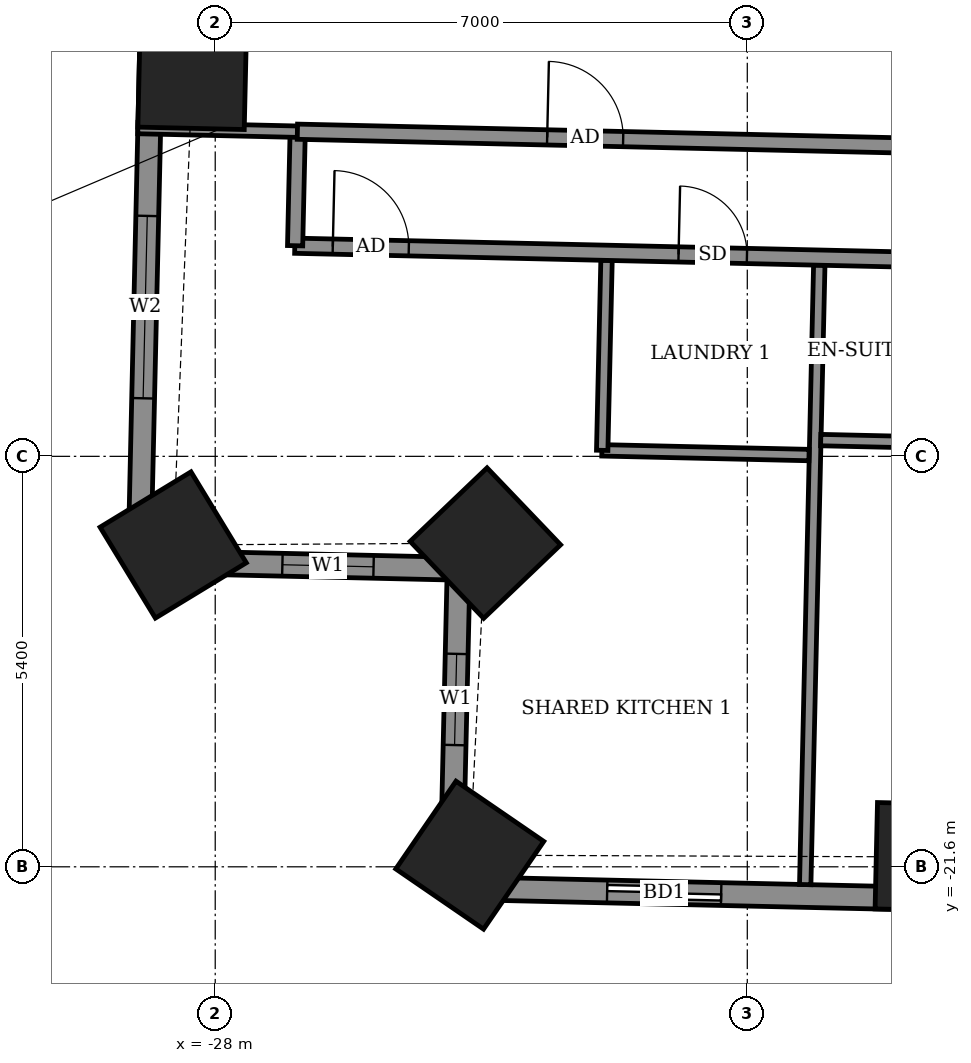
"""IFC4 building model, lengths in metres.
Left out: names, types, materials, properties, quantities, classifications, styles, units other than length and angle.
Written with IfcOpenShell. Run it as: python <this file> out.ifc"""

import sys

from ifc_helpers import new_model, si_unit, direction, frame, frame_2d, origin, origin_2d, place, context, subcontext, project, spatial, rectangle, extrude, element, fill, save


model = new_model("IFC4")
c1 = context("Model", 3, precision=1e-05, world=origin(), true_north=direction((0.0, 1.0)))
c2 = subcontext(c1, "Body", "Model", "MODEL_VIEW")
j1 = project(units=[si_unit("LENGTHUNIT", "METRE"), si_unit("PLANEANGLEUNIT", "RADIAN")], contexts=[c1])
p1 = place(None, origin())
s1 = spatial("IfcSite", under=j1, at=p1, CompositionType="ELEMENT")
p2 = place(p1, origin())
s2 = spatial("IfcBuilding", under=s1, at=p2, CompositionType="ELEMENT")
p3 = place(p2, frame((0.0, 0.0, 109.1)))
s3 = spatial("IfcBuildingStorey", under=s2, at=p3, CompositionType="ELEMENT", Elevation=109.1)
for number, where, z_axis, x_axis in (
    (1, (-28.302, -11.185, -0.55), (0.0, 0.0, 1.0), (-0.023, -1.0, 0.0)),
    (2, (-28.553, -17.366, -0.55), (0.0, 0.0, 1.0), (0.52, -0.854, 0.0)),
    (3, (-24.446, -17.341, -0.55), (0.0, 0.0, 1.0), (0.691, -0.723, 0.0)),
    (4, (-24.651, -21.447, -0.55), (0.0, 0.0, 1.0), (0.825, -0.566, 0.0)),
    (5, (-18.603, -21.47, -0.55), (0.0, 0.0, 1.0), (1.0, -0.023, 0.0)),
):
    element("IfcColumn", number, at=place(p3, frame(where, z_axis=z_axis, x_axis=x_axis)), inside=s3, PredefinedType="COLUMN", context=c2, shape_type="SweptSolid", body=[
        extrude(rectangle(XDim=1.4, YDim=1.4, at=origin_2d()), origin(), (0.0, 0.0, 1.0), 3.6),
    ])
p4 = place(p3, frame((-28.702, -4.557, 0.0), z_axis=(0.0, 0.0, 1.0), x_axis=(-0.022653729471, -0.999743371341, 0.0)))
e6 = element("IfcWall", 6, at=p4, inside=s3, PredefinedType="SOLIDWALL", context=c2, shape_type="SweptSolid", body=[
    extrude(rectangle(XDim=13.03, YDim=0.3, at=frame_2d((6.515, 0.0))), origin(), (0.0, 0.0, 1.0), 3.05),
])
p5 = place(p4, frame((1.042, 0.0, 0.0)))
e7 = element("IfcOpeningElement", 7, at=p5, cuts=e6, PredefinedType="OPENING", context=c2, shape_type="SweptSolid", body=[
    extrude(rectangle(XDim=1.5, YDim=2.4, at=frame_2d((0.75, 1.2))), frame((0.0, 0.16, 0.0), z_axis=(0.0, -1.0, 0.0), x_axis=(1.0, 0.0, 0.0)), (0.0, 0.0, 1.0), 0.32),
])
p6 = place(p4, frame((3.398, 0.0, 0.9)))
e8 = element("IfcOpeningElement", 8, at=p6, cuts=e6, PredefinedType="OPENING", context=c2, shape_type="SweptSolid", body=[
    extrude(rectangle(XDim=2.4, YDim=1.5, at=frame_2d((1.2, 0.75))), frame((0.0, 0.16, 0.0), z_axis=(0.0, -1.0, 0.0), x_axis=(1.0, 0.0, 0.0)), (0.0, 0.0, 1.0), 0.32),
])
p7 = place(p4, frame((8.482, 0.0, 0.9)))
e9 = element("IfcOpeningElement", 9, at=p7, cuts=e6, PredefinedType="OPENING", context=c2, shape_type="SweptSolid", body=[
    extrude(rectangle(XDim=2.4, YDim=1.5, at=frame_2d((1.2, 0.75))), frame((0.0, 0.16, 0.0), z_axis=(0.0, -1.0, 0.0), x_axis=(1.0, 0.0, 0.0)), (0.0, 0.0, 1.0), 0.32),
])
p8 = place(p3, frame((-28.997, -17.583, 0.0), z_axis=(0.0, 0.0, 1.0), x_axis=(0.999739037152, -0.022844202663, 0.0)))
e10 = element("IfcWall", 10, at=p8, inside=s3, PredefinedType="SOLIDWALL", context=c2, shape_type="SweptSolid", body=[
    extrude(rectangle(XDim=4.2, YDim=0.3, at=frame_2d((2.1, 0.0))), origin(), (0.0, 0.0, 1.0), 2.55),
])
p9 = place(p8, frame((1.881, 0.0, 0.9)))
e11 = element("IfcOpeningElement", 11, at=p9, cuts=e10, PredefinedType="OPENING", context=c2, shape_type="SweptSolid", body=[
    extrude(rectangle(XDim=1.2, YDim=1.5, at=frame_2d((0.6, 0.75))), frame((0.0, 0.16, 0.0), z_axis=(0.0, -1.0, 0.0), x_axis=(1.0, 0.0, 0.0)), (0.0, 0.0, 1.0), 0.32),
])
p10 = place(p3, frame((-24.798, -17.679, 0.0), z_axis=(0.0, 0.0, 1.0), x_axis=(-0.022844202663, -0.999739037152, 0.0)))
e12 = element("IfcWall", 12, at=p10, inside=s3, PredefinedType="SOLIDWALL", context=c2, shape_type="SweptSolid", body=[
    extrude(rectangle(XDim=4.2, YDim=0.3, at=frame_2d((2.1, 0.0))), origin(), (0.0, 0.0, 1.0), 2.55),
])
p11 = place(p10, frame((1.12, 0.0, 0.9)))
e13 = element("IfcOpeningElement", 13, at=p11, cuts=e12, PredefinedType="OPENING", context=c2, shape_type="SweptSolid", body=[
    extrude(rectangle(XDim=1.2, YDim=1.5, at=frame_2d((0.6, 0.75))), frame((0.0, 0.16, 0.0), z_axis=(0.0, -1.0, 0.0), x_axis=(1.0, 0.0, 0.0)), (0.0, 0.0, 1.0), 0.32),
])
p12 = place(p3, frame((-24.894, -21.878, 0.0), z_axis=(0.0, 0.0, 1.0), x_axis=(0.999742689045, -0.022683820265, 0.0)))
e14 = element("IfcWall", 14, at=p12, inside=s3, PredefinedType="SOLIDWALL", context=c2, shape_type="SweptSolid", body=[
    extrude(rectangle(XDim=44.708, YDim=0.3, at=frame_2d((22.354, 0.0))), origin(), (0.0, 0.0, 1.0), 3.05),
])
p13 = place(p12, frame((2.051, 0.0, 0.0)))
e15 = element("IfcOpeningElement", 15, at=p13, cuts=e14, PredefinedType="OPENING", context=c2, shape_type="SweptSolid", body=[
    extrude(rectangle(XDim=1.5, YDim=2.4, at=frame_2d((0.75, 1.2))), frame((0.0, 0.16, 0.0), z_axis=(0.0, -1.0, 0.0), x_axis=(1.0, 0.0, 0.0)), (0.0, 0.0, 1.0), 0.32),
])
p14 = place(p12, frame((7.265, 0.0, 0.0)))
e16 = element("IfcOpeningElement", 16, at=p14, cuts=e14, PredefinedType="OPENING", context=c2, shape_type="SweptSolid", body=[
    extrude(rectangle(XDim=1.5, YDim=2.4, at=frame_2d((0.75, 1.2))), frame((0.0, 0.16, 0.0), z_axis=(0.0, -1.0, 0.0), x_axis=(1.0, 0.0, 0.0)), (0.0, 0.0, 1.0), 0.32),
])
p15 = place(p12, frame((10.03, 0.0, 0.0)))
e17 = element("IfcOpeningElement", 17, at=p15, cuts=e14, PredefinedType="OPENING", context=c2, shape_type="SweptSolid", body=[
    extrude(rectangle(XDim=1.5, YDim=2.4, at=frame_2d((0.75, 1.2))), frame((0.0, 0.16, 0.0), z_axis=(0.0, -1.0, 0.0), x_axis=(1.0, 0.0, 0.0)), (0.0, 0.0, 1.0), 0.32),
])
p16 = place(p12, frame((15.5, 0.0, 0.0)))
e18 = element("IfcOpeningElement", 18, at=p16, cuts=e14, PredefinedType="OPENING", context=c2, shape_type="SweptSolid", body=[
    extrude(rectangle(XDim=1.5, YDim=2.4, at=frame_2d((0.75, 1.2))), frame((0.0, 0.16, 0.0), z_axis=(0.0, -1.0, 0.0), x_axis=(1.0, 0.0, 0.0)), (0.0, 0.0, 1.0), 0.32),
])
p17 = place(p12, frame((20.745, 0.0, 0.0)))
e19 = element("IfcOpeningElement", 19, at=p17, cuts=e14, PredefinedType="OPENING", context=c2, shape_type="SweptSolid", body=[
    extrude(rectangle(XDim=1.5, YDim=2.4, at=frame_2d((0.75, 1.2))), frame((0.0, 0.16, 0.0), z_axis=(0.0, -1.0, 0.0), x_axis=(1.0, 0.0, 0.0)), (0.0, 0.0, 1.0), 0.32),
])
p18 = place(p12, frame((26.41, 0.0, 0.0)))
e20 = element("IfcOpeningElement", 20, at=p18, cuts=e14, PredefinedType="OPENING", context=c2, shape_type="SweptSolid", body=[
    extrude(rectangle(XDim=1.2, YDim=2.4, at=frame_2d((0.6, 1.2))), frame((0.0, 0.16, 0.0), z_axis=(0.0, -1.0, 0.0), x_axis=(1.0, 0.0, 0.0)), (0.0, 0.0, 1.0), 0.32),
])
p19 = place(p12, frame((29.024, 0.0, 0.0)))
e21 = element("IfcOpeningElement", 21, at=p19, cuts=e14, PredefinedType="OPENING", context=c2, shape_type="SweptSolid", body=[
    extrude(rectangle(XDim=1.5, YDim=2.4, at=frame_2d((0.75, 1.2))), frame((0.0, 0.16, 0.0), z_axis=(0.0, -1.0, 0.0), x_axis=(1.0, 0.0, 0.0)), (0.0, 0.0, 1.0), 0.32),
])
p20 = place(p12, frame((34.45, 0.0, 0.0)))
e22 = element("IfcOpeningElement", 22, at=p20, cuts=e14, PredefinedType="OPENING", context=c2, shape_type="SweptSolid", body=[
    extrude(rectangle(XDim=1.5, YDim=2.4, at=frame_2d((0.75, 1.2))), frame((0.0, 0.16, 0.0), z_axis=(0.0, -1.0, 0.0), x_axis=(1.0, 0.0, 0.0)), (0.0, 0.0, 1.0), 0.32),
])
p21 = place(p12, frame((40.087, 0.0, 0.9)))
e23 = element("IfcOpeningElement", 23, at=p21, cuts=e14, PredefinedType="OPENING", context=c2, shape_type="SweptSolid", body=[
    extrude(rectangle(XDim=2.4, YDim=1.5, at=frame_2d((1.2, 0.75))), frame((0.0, 0.16, 0.0), z_axis=(0.0, -1.0, 0.0), x_axis=(1.0, 0.0, 0.0)), (0.0, 0.0, 1.0), 0.32),
])
p22 = place(p3, frame((-20.238, -21.834, 0.0), z_axis=(0.0, 0.0, 1.0), x_axis=(0.0227037155, 0.99974223743, 0.0)))
e24 = element("IfcWall", 24, at=p22, inside=s3, PredefinedType="PARTITIONING", context=c2, shape_type="SweptSolid", body=[
    extrude(rectangle(XDim=8.151, YDim=0.15, at=frame_2d((4.076, 0.0))), origin(), (0.0, 0.0, 1.0), 2.55),
])
p23 = place(p3, frame((-22.913, -16.121, 0.0), z_axis=(0.0, 0.0, 1.0), x_axis=(0.999741187782, -0.022749889061, 0.0)))
e25 = element("IfcWall", 25, at=p23, inside=s3, PredefinedType="PARTITIONING", context=c2, shape_type="SweptSolid", body=[
    extrude(rectangle(XDim=2.726, YDim=0.15, at=frame_2d((1.363, 0.0))), origin(), (0.0, 0.0, 1.0), 3.05),
])
p24 = place(p3, frame((-22.909, -16.121, 0.0), z_axis=(0.0, 0.0, 1.0), x_axis=(0.022756903044, 0.999741028149, 0.0)))
e26 = element("IfcWall", 26, at=p24, inside=s3, PredefinedType="PARTITIONING", context=c2, shape_type="SweptSolid", body=[
    extrude(rectangle(XDim=2.5, YDim=0.15, at=frame_2d((1.25, 0.0))), origin(), (0.0, 0.0, 1.0), 3.05),
])
p25 = place(p3, frame((-20.034, -15.986, 0.0), z_axis=(0.0, 0.0, 1.0), x_axis=(0.999740478815, -0.022781023197, 0.0)))
e27 = element("IfcWall", 27, at=p25, inside=s3, PredefinedType="PARTITIONING", context=c2, shape_type="SweptSolid", body=[
    extrude(rectangle(XDim=2.325, YDim=0.15, at=frame_2d((1.163, 0.0))), origin(), (0.0, 0.0, 1.0), 3.05),
])
p26 = place(p3, frame((-26.953, -13.429, 0.0), z_axis=(0.0, 0.0, 1.0), x_axis=(0.999742734556, -0.02268181435, 0.0)))
e28 = element("IfcWall", 28, at=p26, inside=s3, PredefinedType="PARTITIONING", context=c2, shape_type="SweptSolid", body=[
    extrude(rectangle(XDim=50.708, YDim=0.2, at=frame_2d((25.354, 0.0))), origin(), (0.0, 0.0, 1.0), 3.05),
])
p27 = place(p26, frame((0.5, 0.0, 0.0)))
e29 = element("IfcOpeningElement", 29, at=p27, cuts=e28, PredefinedType="OPENING", context=c2, shape_type="SweptSolid", body=[
    extrude(rectangle(XDim=1.0, YDim=2.1, at=frame_2d((0.5, 1.05))), frame((0.0, 0.11, 0.0), z_axis=(0.0, -1.0, 0.0), x_axis=(1.0, 0.0, 0.0)), (0.0, 0.0, 1.0), 0.22),
])
p28 = place(p26, frame((5.05, 0.0, 0.0)))
e30 = element("IfcOpeningElement", 30, at=p28, cuts=e28, PredefinedType="OPENING", context=c2, shape_type="SweptSolid", body=[
    extrude(rectangle(XDim=0.9, YDim=2.1, at=frame_2d((0.45, 1.05))), frame((0.0, 0.11, 0.0), z_axis=(0.0, -1.0, 0.0), x_axis=(1.0, 0.0, 0.0)), (0.0, 0.0, 1.0), 0.22),
])
p29 = place(p26, frame((9.975, 0.0, 0.0)))
e31 = element("IfcOpeningElement", 31, at=p29, cuts=e28, PredefinedType="OPENING", context=c2, shape_type="SweptSolid", body=[
    extrude(rectangle(XDim=0.9, YDim=2.1, at=frame_2d((0.45, 1.05))), frame((0.0, 0.11, 0.0), z_axis=(0.0, -1.0, 0.0), x_axis=(1.0, 0.0, 0.0)), (0.0, 0.0, 1.0), 0.22),
])
p30 = place(p26, frame((12.175, 0.0, 0.0)))
e32 = element("IfcOpeningElement", 32, at=p30, cuts=e28, PredefinedType="OPENING", context=c2, shape_type="SweptSolid", body=[
    extrude(rectangle(XDim=0.9, YDim=2.1, at=frame_2d((0.45, 1.05))), frame((0.0, 0.11, 0.0), z_axis=(0.0, -1.0, 0.0), x_axis=(1.0, 0.0, 0.0)), (0.0, 0.0, 1.0), 0.22),
])
p31 = place(p26, frame((19.25, 0.0, 0.0)))
e33 = element("IfcOpeningElement", 33, at=p31, cuts=e28, PredefinedType="OPENING", context=c2, shape_type="SweptSolid", body=[
    extrude(rectangle(XDim=0.9, YDim=2.1, at=frame_2d((0.45, 1.05))), frame((0.0, 0.11, 0.0), z_axis=(0.0, -1.0, 0.0), x_axis=(1.0, 0.0, 0.0)), (0.0, 0.0, 1.0), 0.22),
])
p32 = place(p26, frame((21.625, 0.0, 0.0)))
e34 = element("IfcOpeningElement", 34, at=p32, cuts=e28, PredefinedType="OPENING", context=c2, shape_type="SweptSolid", body=[
    extrude(rectangle(XDim=0.9, YDim=2.1, at=frame_2d((0.45, 1.05))), frame((0.0, 0.11, 0.0), z_axis=(0.0, -1.0, 0.0), x_axis=(1.0, 0.0, 0.0)), (0.0, 0.0, 1.0), 0.22),
])
p33 = place(p26, frame((28.7, 0.0, 0.0)))
e35 = element("IfcOpeningElement", 35, at=p33, cuts=e28, PredefinedType="OPENING", context=c2, shape_type="SweptSolid", body=[
    extrude(rectangle(XDim=0.9, YDim=2.1, at=frame_2d((0.45, 1.05))), frame((0.0, 0.11, 0.0), z_axis=(0.0, -1.0, 0.0), x_axis=(1.0, 0.0, 0.0)), (0.0, 0.0, 1.0), 0.22),
])
p34 = place(p26, frame((31.025, 0.0, 0.0)))
e36 = element("IfcOpeningElement", 36, at=p34, cuts=e28, PredefinedType="OPENING", context=c2, shape_type="SweptSolid", body=[
    extrude(rectangle(XDim=0.9, YDim=2.1, at=frame_2d((0.45, 1.05))), frame((0.0, 0.11, 0.0), z_axis=(0.0, -1.0, 0.0), x_axis=(1.0, 0.0, 0.0)), (0.0, 0.0, 1.0), 0.22),
])
p35 = place(p26, frame((38.2, 0.0, 0.0)))
e37 = element("IfcOpeningElement", 37, at=p35, cuts=e28, PredefinedType="OPENING", context=c2, shape_type="SweptSolid", body=[
    extrude(rectangle(XDim=0.9, YDim=2.1, at=frame_2d((0.45, 1.05))), frame((0.0, 0.11, 0.0), z_axis=(0.0, -1.0, 0.0), x_axis=(1.0, 0.0, 0.0)), (0.0, 0.0, 1.0), 0.22),
])
p36 = place(p26, frame((44.484, 0.0, 0.0)))
e38 = element("IfcOpeningElement", 38, at=p36, cuts=e28, PredefinedType="OPENING", context=c2, shape_type="SweptSolid", body=[
    extrude(rectangle(XDim=1.0, YDim=2.1, at=frame_2d((0.5, 1.05))), frame((0.0, 0.11, 0.0), z_axis=(0.0, -1.0, 0.0), x_axis=(1.0, 0.0, 0.0)), (0.0, 0.0, 1.0), 0.22),
])
p37 = place(p3, frame((-26.949, -13.429, 0.0), z_axis=(0.0, 0.0, 1.0), x_axis=(0.022617910375, 0.999744182344, 0.0)))
e39 = element("IfcWall", 39, at=p37, inside=s3, PredefinedType="PARTITIONING", context=c2, shape_type="SweptSolid", body=[
    extrude(rectangle(XDim=1.5, YDim=0.2, at=frame_2d((0.75, 0.0))), origin(), (0.0, 0.0, 1.0), 3.05),
])
p38 = place(p3, frame((-29.018, -11.881, 0.0), z_axis=(0.0, 0.0, 1.0), x_axis=(0.999741236023, -0.022747769011, 0.0)))
e40 = element("IfcWall", 40, at=p38, inside=s3, PredefinedType="PARTITIONING", context=c2, shape_type="SweptSolid", body=[
    extrude(rectangle(XDim=2.104, YDim=0.15, at=frame_2d((1.052, 0.0))), origin(), (0.0, 0.0, 1.0), 2.55),
])
p39 = place(p3, frame((-26.919, -11.929, 0.0), z_axis=(0.0, 0.0, 1.0), x_axis=(0.999741418429, -0.022739751035, 0.0)))
e41 = element("IfcWall", 41, at=p39, inside=s3, PredefinedType="PARTITIONING", context=c2, shape_type="SweptSolid", body=[
    extrude(rectangle(XDim=9.673, YDim=0.2, at=frame_2d((4.837, 0.0))), origin(), (0.0, 0.0, 1.0), 3.05),
])
p40 = place(p39, frame((3.287, 0.0, 0.0)))
e42 = element("IfcOpeningElement", 42, at=p40, cuts=e41, PredefinedType="OPENING", context=c2, shape_type="SweptSolid", body=[
    extrude(rectangle(XDim=1.0, YDim=2.1, at=frame_2d((0.5, 1.05))), frame((0.0, 0.11, 0.0), z_axis=(0.0, -1.0, 0.0), x_axis=(1.0, 0.0, 0.0)), (0.0, 0.0, 1.0), 0.22),
])
p41 = place(p7, origin())
e43 = element("IfcWindow", 43, at=p41, inside=s3, PartitioningType="DOUBLE_PANEL_VERTICAL", PredefinedType="WINDOW", context=c2, shape_type="SweptSolid", body=[
    extrude(rectangle(XDim=2.4, YDim=1.5, at=frame_2d((1.2, 0.75))), frame((0.0, 0.03, 0.0), z_axis=(0.0, -1.0, 0.0), x_axis=(1.0, 0.0, 0.0)), (0.0, 0.0, 1.0), 0.06),
])
fill(e9, e43)
p42 = place(p9, origin())
e44 = element("IfcWindow", 44, at=p42, inside=s3, PartitioningType="SINGLE_PANEL", PredefinedType="WINDOW", context=c2, shape_type="SweptSolid", body=[
    extrude(rectangle(XDim=1.2, YDim=1.5, at=frame_2d((0.6, 0.75))), frame((0.0, 0.03, 0.0), z_axis=(0.0, -1.0, 0.0), x_axis=(1.0, 0.0, 0.0)), (0.0, 0.0, 1.0), 0.06),
])
fill(e11, e44)
p43 = place(p11, origin())
e45 = element("IfcWindow", 45, at=p43, inside=s3, PartitioningType="SINGLE_PANEL", PredefinedType="WINDOW", context=c2, shape_type="SweptSolid", body=[
    extrude(rectangle(XDim=1.2, YDim=1.5, at=frame_2d((0.6, 0.75))), frame((0.0, 0.03, 0.0), z_axis=(0.0, -1.0, 0.0), x_axis=(1.0, 0.0, 0.0)), (0.0, 0.0, 1.0), 0.06),
])
fill(e13, e45)
p44 = place(p13, origin())
e46 = element("IfcDoor", 46, at=p44, inside=s3, OperationType="SLIDING_TO_LEFT", PredefinedType="DOOR", context=c2, shape_type="SweptSolid", body=[
    extrude(rectangle(XDim=1.5, YDim=2.4, at=frame_2d((0.75, 1.2))), frame((0.0, 0.025, 0.0), z_axis=(0.0, -1.0, 0.0), x_axis=(1.0, 0.0, 0.0)), (0.0, 0.0, 1.0), 0.05),
])
fill(e15, e46)
p45 = place(p27, origin())
e47 = element("IfcDoor", 47, at=p45, inside=s3, OperationType="SINGLE_SWING_LEFT", PredefinedType="DOOR", context=c2, shape_type="SweptSolid", body=[
    extrude(rectangle(XDim=1.0, YDim=2.1, at=frame_2d((0.5, 1.05))), frame((0.0, 0.025, 0.0), z_axis=(0.0, -1.0, 0.0), x_axis=(1.0, 0.0, 0.0)), (0.0, 0.0, 1.0), 0.05),
])
fill(e29, e47)
p46 = place(p28, origin())
e48 = element("IfcDoor", 48, at=p46, inside=s3, OperationType="SINGLE_SWING_LEFT", PredefinedType="DOOR", context=c2, shape_type="SweptSolid", body=[
    extrude(rectangle(XDim=0.9, YDim=2.1, at=frame_2d((0.45, 1.05))), frame((0.0, 0.025, 0.0), z_axis=(0.0, -1.0, 0.0), x_axis=(1.0, 0.0, 0.0)), (0.0, 0.0, 1.0), 0.05),
])
fill(e30, e48)
p47 = place(p40, origin())
e49 = element("IfcDoor", 49, at=p47, inside=s3, OperationType="SINGLE_SWING_RIGHT", PredefinedType="DOOR", context=c2, shape_type="SweptSolid", body=[
    extrude(rectangle(XDim=1.0, YDim=2.1, at=frame_2d((0.5, 1.05))), frame((0.0, 0.025, 0.0), z_axis=(0.0, -1.0, 0.0), x_axis=(1.0, 0.0, 0.0)), (0.0, 0.0, 1.0), 0.05),
])
fill(e42, e49)
save(model, sys.argv[1])
